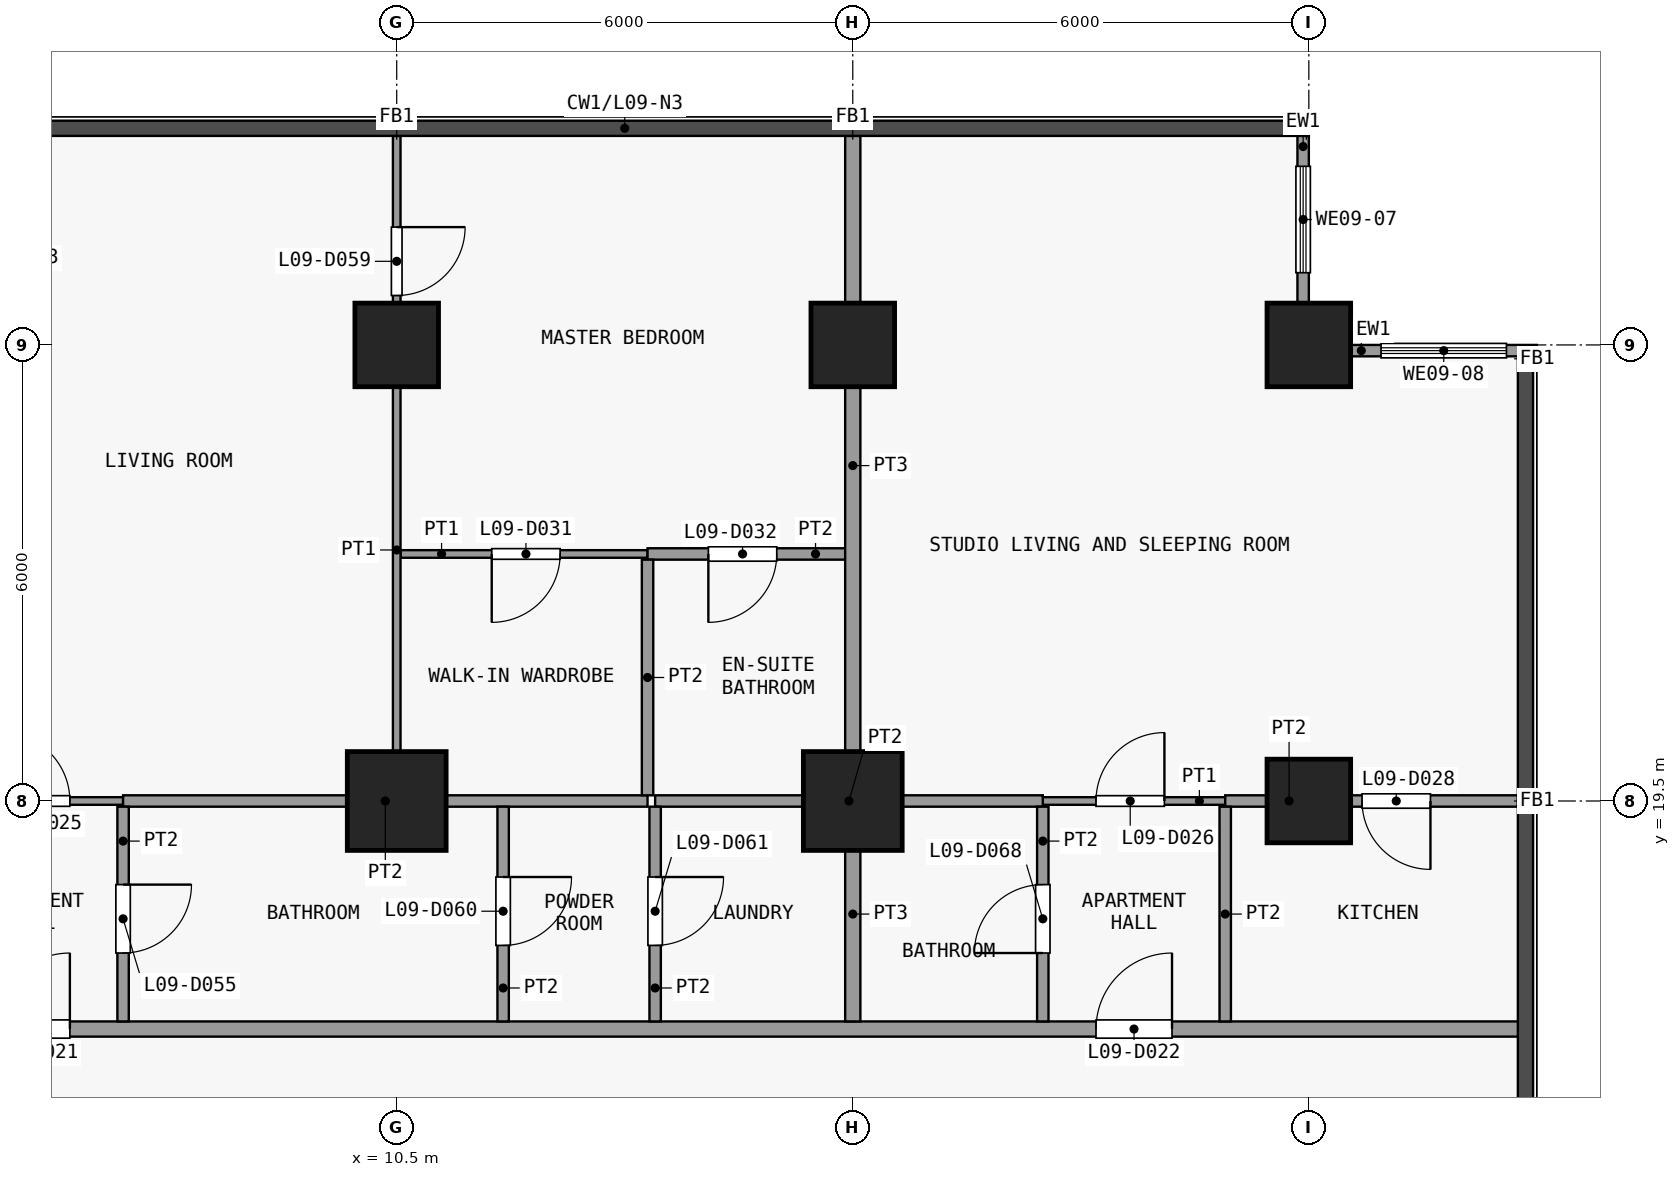
"""IFC4 building model, lengths in metres.
Left out: names, types, materials, properties, quantities, classifications, styles, units other than length and angle.
Written with IfcOpenShell. Run it as: python <this file> out.ifc"""

import sys

from ifc_helpers import new_model, si_unit, direction, frame, frame_2d, origin, origin_2d, place, context, subcontext, project, spatial, rectangle, extrude, element, fill, save


model = new_model("IFC4")
c1 = context("Model", 3, precision=1e-05, world=origin(), true_north=direction((0.0, 1.0)))
c2 = subcontext(c1, "Body", "Model", "MODEL_VIEW")
j1 = project(units=[si_unit("LENGTHUNIT", "METRE"), si_unit("PLANEANGLEUNIT", "RADIAN")], contexts=[c1])
p1 = place(None, origin())
s1 = spatial("IfcSite", under=j1, at=p1, CompositionType="ELEMENT")
p2 = place(p1, origin())
s2 = spatial("IfcBuilding", under=s1, at=p2, CompositionType="ELEMENT")
p3 = place(p2, frame((0.0, 0.0, 43.3)))
s3 = spatial("IfcBuildingStorey", under=s2, at=p3, CompositionType="ELEMENT", Elevation=43.3)
p4 = place(p3, frame((10.5, 19.5, 0.0), z_axis=(0.0, 0.0, 1.0), x_axis=(1.0, 0.0, 0.0)))
e1 = element("IfcColumn", 1, at=p4, inside=s3, PredefinedType="COLUMN", context=c2, shape_type="SweptSolid", body=[
    extrude(rectangle(XDim=1.3, YDim=1.3, at=origin_2d()), origin(), (0.0, 0.0, 1.0), 3.6),
])
p5 = place(p3, frame((10.5, 25.5, 0.0), z_axis=(0.0, 0.0, 1.0), x_axis=(1.0, 0.0, 0.0)))
e2 = element("IfcColumn", 2, at=p5, inside=s3, PredefinedType="COLUMN", context=c2, shape_type="SweptSolid", body=[
    extrude(rectangle(XDim=1.1, YDim=1.1, at=origin_2d()), origin(), (0.0, 0.0, 1.0), 3.6),
])
p6 = place(p3, frame((16.5, 19.5, 0.0), z_axis=(0.0, 0.0, 1.0), x_axis=(1.0, 0.0, 0.0)))
e3 = element("IfcColumn", 3, at=p6, inside=s3, PredefinedType="COLUMN", context=c2, shape_type="SweptSolid", body=[
    extrude(rectangle(XDim=1.3, YDim=1.3, at=origin_2d()), origin(), (0.0, 0.0, 1.0), 3.6),
])
for number, where, z_axis, x_axis in (
    (4, (16.5, 25.5, 0.0), (0.0, 0.0, 1.0), (1.0, 0.0, 0.0)),
    (5, (22.5, 19.5, 0.0), (0.0, 0.0, 1.0), (1.0, 0.0, 0.0)),
    (6, (22.5, 25.5, 0.0), (0.0, 0.0, 1.0), (1.0, 0.0, 0.0)),
):
    element("IfcColumn", number, at=place(p3, frame(where, z_axis=z_axis, x_axis=x_axis)), inside=s3, PredefinedType="COLUMN", context=c2, shape_type="SweptSolid", body=[
        extrude(rectangle(XDim=1.1, YDim=1.1, at=origin_2d()), origin(), (0.0, 0.0, 1.0), 3.6),
    ])
p7 = place(p3, frame((22.425, 28.25, 0.0), z_axis=(0.0, 0.0, 1.0), x_axis=(0.0, -1.0, 0.0)))
e7 = element("IfcWall", 7, at=p7, inside=s3, PredefinedType="SOLIDWALL", context=c2, shape_type="SweptSolid", body=[
    extrude(rectangle(XDim=2.2, YDim=0.15, at=frame_2d((1.1, 0.0))), origin(), (0.0, 0.0, 1.0), 3.3),
])
p8 = place(p7, frame((0.4, 0.0, 0.9)))
e8 = element("IfcOpeningElement", 8, at=p8, cuts=e7, PredefinedType="OPENING", context=c2, shape_type="SweptSolid", body=[
    extrude(rectangle(XDim=1.4, YDim=2.4, at=frame_2d((0.7, 1.2))), frame((0.0, 0.085, 0.0), z_axis=(0.0, -1.0, 0.0), x_axis=(1.0, 0.0, 0.0)), (0.0, 0.0, 1.0), 0.17),
])
p9 = place(p3, frame((23.05, 25.425, 0.0), z_axis=(0.0, 0.0, 1.0), x_axis=(1.0, 0.0, 0.0)))
e9 = element("IfcWall", 9, at=p9, inside=s3, PredefinedType="SOLIDWALL", context=c2, shape_type="SweptSolid", body=[
    extrude(rectangle(XDim=2.45, YDim=0.15, at=frame_2d((1.225, 0.0))), origin(), (0.0, 0.0, 1.0), 3.3),
])
p10 = place(p9, frame((0.4, 0.0, 0.9)))
e10 = element("IfcOpeningElement", 10, at=p10, cuts=e9, PredefinedType="OPENING", context=c2, shape_type="SweptSolid", body=[
    extrude(rectangle(XDim=1.65, YDim=2.4, at=frame_2d((0.825, 1.2))), frame((0.0, 0.085, 0.0), z_axis=(0.0, -1.0, 0.0), x_axis=(1.0, 0.0, 0.0)), (0.0, 0.0, 1.0), 0.17),
])
p11 = place(p3, frame((-25.35, 16.5, 0.0), z_axis=(0.0, 0.0, 1.0), x_axis=(1.0, 0.0, 0.0)))
e11 = element("IfcWall", 11, at=p11, inside=s3, PredefinedType="PARTITIONING", context=c2, shape_type="SweptSolid", body=[
    extrude(rectangle(XDim=50.7, YDim=0.2, at=frame_2d((25.35, 0.0))), origin(), (0.0, 0.0, 1.0), 3.3),
])
p12 = place(p11, frame((7.05, 0.0, 0.0)))
e12 = element("IfcOpeningElement", 12, at=p12, cuts=e11, PredefinedType="OPENING", context=c2, shape_type="SweptSolid", body=[
    extrude(rectangle(XDim=1.0, YDim=2.1, at=frame_2d((0.5, 1.05))), frame((0.0, 0.11, 0.0), z_axis=(0.0, -1.0, 0.0), x_axis=(1.0, 0.0, 0.0)), (0.0, 0.0, 1.0), 0.22),
])
p13 = place(p11, frame((15.55, 0.0, 0.0)))
e13 = element("IfcOpeningElement", 13, at=p13, cuts=e11, PredefinedType="OPENING", context=c2, shape_type="SweptSolid", body=[
    extrude(rectangle(XDim=1.0, YDim=2.1, at=frame_2d((0.5, 1.05))), frame((0.0, 0.11, 0.0), z_axis=(0.0, -1.0, 0.0), x_axis=(1.0, 0.0, 0.0)), (0.0, 0.0, 1.0), 0.22),
])
p14 = place(p11, frame((30.55, 0.0, 0.0)))
e14 = element("IfcOpeningElement", 14, at=p14, cuts=e11, PredefinedType="OPENING", context=c2, shape_type="SweptSolid", body=[
    extrude(rectangle(XDim=1.0, YDim=2.1, at=frame_2d((0.5, 1.05))), frame((0.0, 0.11, 0.0), z_axis=(0.0, -1.0, 0.0), x_axis=(1.0, 0.0, 0.0)), (0.0, 0.0, 1.0), 0.22),
])
p15 = place(p11, frame((45.05, 0.0, 0.0)))
e15 = element("IfcOpeningElement", 15, at=p15, cuts=e11, PredefinedType="OPENING", context=c2, shape_type="SweptSolid", body=[
    extrude(rectangle(XDim=1.0, YDim=2.1, at=frame_2d((0.5, 1.05))), frame((0.0, 0.11, 0.0), z_axis=(0.0, -1.0, 0.0), x_axis=(1.0, 0.0, 0.0)), (0.0, 0.0, 1.0), 0.22),
])
p16 = place(p3, frame((4.5, 19.5, 0.0), z_axis=(0.0, 0.0, 1.0), x_axis=(1.0, 0.0, 0.0)))
e16 = element("IfcWall", 16, at=p16, inside=s3, PredefinedType="PARTITIONING", context=c2, shape_type="SweptSolid", body=[
    extrude(rectangle(XDim=2.4, YDim=0.1, at=frame_2d((1.2, 0.0))), origin(), (0.0, 0.0, 1.0), 3.3),
])
p17 = place(p16, frame((0.8, 0.0, 0.0)))
e17 = element("IfcOpeningElement", 17, at=p17, cuts=e16, PredefinedType="OPENING", context=c2, shape_type="SweptSolid", body=[
    extrude(rectangle(XDim=0.9, YDim=2.1, at=frame_2d((0.45, 1.05))), frame((0.0, 0.06, 0.0), z_axis=(0.0, -1.0, 0.0), x_axis=(1.0, 0.0, 0.0)), (0.0, 0.0, 1.0), 0.12),
])
p18 = place(p3, frame((19.0, 19.5, 0.0), z_axis=(0.0, 0.0, 1.0), x_axis=(1.0, 0.0, 0.0)))
e18 = element("IfcWall", 18, at=p18, inside=s3, PredefinedType="PARTITIONING", context=c2, shape_type="SweptSolid", body=[
    extrude(rectangle(XDim=2.4, YDim=0.1, at=frame_2d((1.2, 0.0))), origin(), (0.0, 0.0, 1.0), 3.3),
])
p19 = place(p18, frame((0.7, 0.0, 0.0)))
e19 = element("IfcOpeningElement", 19, at=p19, cuts=e18, PredefinedType="OPENING", context=c2, shape_type="SweptSolid", body=[
    extrude(rectangle(XDim=0.9, YDim=2.1, at=frame_2d((0.45, 1.05))), frame((0.0, 0.06, 0.0), z_axis=(0.0, -1.0, 0.0), x_axis=(1.0, 0.0, 0.0)), (0.0, 0.0, 1.0), 0.12),
])
p20 = place(p3, frame((6.9, 19.5, 0.0), z_axis=(0.0, 0.0, 1.0), x_axis=(1.0, 0.0, 0.0)))
e20 = element("IfcWall", 20, at=p20, inside=s3, PredefinedType="PARTITIONING", context=c2, shape_type="SweptSolid", body=[
    extrude(rectangle(XDim=6.9, YDim=0.15, at=frame_2d((3.45, 0.0))), origin(), (0.0, 0.0, 1.0), 3.3),
])
p21 = place(p3, frame((13.9, 19.5, 0.0), z_axis=(0.0, 0.0, 1.0), x_axis=(1.0, 0.0, 0.0)))
e21 = element("IfcWall", 21, at=p21, inside=s3, PredefinedType="PARTITIONING", context=c2, shape_type="SweptSolid", body=[
    extrude(rectangle(XDim=5.1, YDim=0.15, at=frame_2d((2.55, 0.0))), origin(), (0.0, 0.0, 1.0), 3.3),
])
p22 = place(p3, frame((21.4, 19.5, 0.0), z_axis=(0.0, 0.0, 1.0), x_axis=(1.0, 0.0, 0.0)))
e22 = element("IfcWall", 22, at=p22, inside=s3, PredefinedType="PARTITIONING", context=c2, shape_type="SweptSolid", body=[
    extrude(rectangle(XDim=3.85, YDim=0.15, at=frame_2d((1.925, 0.0))), origin(), (0.0, 0.0, 1.0), 3.3),
])
p23 = place(p22, frame((1.8, 0.0, 0.0)))
e23 = element("IfcOpeningElement", 23, at=p23, cuts=e22, PredefinedType="OPENING", context=c2, shape_type="SweptSolid", body=[
    extrude(rectangle(XDim=0.9, YDim=2.1, at=frame_2d((0.45, 1.05))), frame((0.0, 0.085, 0.0), z_axis=(0.0, -1.0, 0.0), x_axis=(1.0, 0.0, 0.0)), (0.0, 0.0, 1.0), 0.17),
])
p24 = place(p3, frame((10.55, 22.75, 0.0), z_axis=(0.0, 0.0, 1.0), x_axis=(1.0, 0.0, 0.0)))
e24 = element("IfcWall", 24, at=p24, inside=s3, PredefinedType="PARTITIONING", context=c2, shape_type="SweptSolid", body=[
    extrude(rectangle(XDim=3.25, YDim=0.1, at=frame_2d((1.625, 0.0))), origin(), (0.0, 0.0, 1.0), 3.3),
])
p25 = place(p24, frame((1.2, 0.0, 0.0)))
e25 = element("IfcOpeningElement", 25, at=p25, cuts=e24, PredefinedType="OPENING", context=c2, shape_type="SweptSolid", body=[
    extrude(rectangle(XDim=0.9, YDim=2.1, at=frame_2d((0.45, 1.05))), frame((0.0, 0.06, 0.0), z_axis=(0.0, -1.0, 0.0), x_axis=(1.0, 0.0, 0.0)), (0.0, 0.0, 1.0), 0.12),
])
p26 = place(p3, frame((13.8, 22.75, 0.0), z_axis=(0.0, 0.0, 1.0), x_axis=(1.0, 0.0, 0.0)))
e26 = element("IfcWall", 26, at=p26, inside=s3, PredefinedType="PARTITIONING", context=c2, shape_type="SweptSolid", body=[
    extrude(rectangle(XDim=2.6, YDim=0.15, at=frame_2d((1.3, 0.0))), origin(), (0.0, 0.0, 1.0), 3.3),
])
p27 = place(p26, frame((0.8, 0.0, 0.0)))
e27 = element("IfcOpeningElement", 27, at=p27, cuts=e26, PredefinedType="OPENING", context=c2, shape_type="SweptSolid", body=[
    extrude(rectangle(XDim=0.9, YDim=2.1, at=frame_2d((0.45, 1.05))), frame((0.0, 0.085, 0.0), z_axis=(0.0, -1.0, 0.0), x_axis=(1.0, 0.0, 0.0)), (0.0, 0.0, 1.0), 0.17),
])
p28 = place(p3, frame((6.9, 16.6, 0.0), z_axis=(0.0, 0.0, 1.0), x_axis=(0.0, 1.0, 0.0)))
e28 = element("IfcWall", 28, at=p28, inside=s3, PredefinedType="PARTITIONING", context=c2, shape_type="SweptSolid", body=[
    extrude(rectangle(XDim=2.825, YDim=0.15, at=frame_2d((1.413, 0.0))), origin(), (0.0, 0.0, 1.0), 3.3),
])
p29 = place(p28, frame((0.9, 0.0, 0.0)))
e29 = element("IfcOpeningElement", 29, at=p29, cuts=e28, PredefinedType="OPENING", context=c2, shape_type="SweptSolid", body=[
    extrude(rectangle(XDim=0.9, YDim=2.1, at=frame_2d((0.45, 1.05))), frame((0.0, 0.085, 0.0), z_axis=(0.0, -1.0, 0.0), x_axis=(1.0, 0.0, 0.0)), (0.0, 0.0, 1.0), 0.17),
])
p30 = place(p3, frame((10.5, 19.575, 0.0), z_axis=(0.0, 0.0, 1.0), x_axis=(0.0, 1.0, 0.0)))
e30 = element("IfcWall", 30, at=p30, inside=s3, PredefinedType="PARTITIONING", context=c2, shape_type="SweptSolid", body=[
    extrude(rectangle(XDim=8.675, YDim=0.1, at=frame_2d((4.337, 0.0))), origin(), (0.0, 0.0, 1.0), 3.3),
])
p31 = place(p30, frame((6.575, 0.0, 0.0)))
e31 = element("IfcOpeningElement", 31, at=p31, cuts=e30, PredefinedType="OPENING", context=c2, shape_type="SweptSolid", body=[
    extrude(rectangle(XDim=0.9, YDim=2.1, at=frame_2d((0.45, 1.05))), frame((0.0, 0.06, 0.0), z_axis=(0.0, -1.0, 0.0), x_axis=(1.0, 0.0, 0.0)), (0.0, 0.0, 1.0), 0.12),
])
p32 = place(p3, frame((11.9, 16.6, 0.0), z_axis=(0.0, 0.0, 1.0), x_axis=(0.0, 1.0, 0.0)))
e32 = element("IfcWall", 32, at=p32, inside=s3, PredefinedType="PARTITIONING", context=c2, shape_type="SweptSolid", body=[
    extrude(rectangle(XDim=2.825, YDim=0.15, at=frame_2d((1.413, 0.0))), origin(), (0.0, 0.0, 1.0), 3.3),
])
p33 = place(p32, frame((1.0, 0.0, 0.0)))
e33 = element("IfcOpeningElement", 33, at=p33, cuts=e32, PredefinedType="OPENING", context=c2, shape_type="SweptSolid", body=[
    extrude(rectangle(XDim=0.9, YDim=2.1, at=frame_2d((0.45, 1.05))), frame((0.0, 0.085, 0.0), z_axis=(0.0, -1.0, 0.0), x_axis=(1.0, 0.0, 0.0)), (0.0, 0.0, 1.0), 0.17),
])
p34 = place(p3, frame((13.8, 19.575, 0.0), z_axis=(0.0, 0.0, 1.0), x_axis=(0.0, 1.0, 0.0)))
e34 = element("IfcWall", 34, at=p34, inside=s3, PredefinedType="PARTITIONING", context=c2, shape_type="SweptSolid", body=[
    extrude(rectangle(XDim=3.1, YDim=0.15, at=frame_2d((1.55, 0.0))), origin(), (0.0, 0.0, 1.0), 3.3),
])
p35 = place(p3, frame((13.9, 16.6, 0.0), z_axis=(0.0, 0.0, 1.0), x_axis=(0.0, 1.0, 0.0)))
e35 = element("IfcWall", 35, at=p35, inside=s3, PredefinedType="PARTITIONING", context=c2, shape_type="SweptSolid", body=[
    extrude(rectangle(XDim=2.825, YDim=0.15, at=frame_2d((1.413, 0.0))), origin(), (0.0, 0.0, 1.0), 3.3),
])
p36 = place(p35, frame((1.0, 0.0, 0.0)))
e36 = element("IfcOpeningElement", 36, at=p36, cuts=e35, PredefinedType="OPENING", context=c2, shape_type="SweptSolid", body=[
    extrude(rectangle(XDim=0.9, YDim=2.1, at=frame_2d((0.45, 1.05))), frame((0.0, 0.085, 0.0), z_axis=(0.0, -1.0, 0.0), x_axis=(1.0, 0.0, 0.0)), (0.0, 0.0, 1.0), 0.17),
])
p37 = place(p3, frame((16.5, 16.6, 0.0), z_axis=(0.0, 0.0, 1.0), x_axis=(0.0, 1.0, 0.0)))
e37 = element("IfcWall", 37, at=p37, inside=s3, PredefinedType="PARTITIONING", context=c2, shape_type="SweptSolid", body=[
    extrude(rectangle(XDim=2.825, YDim=0.2, at=frame_2d((1.413, 0.0))), origin(), (0.0, 0.0, 1.0), 3.3),
])
p38 = place(p3, frame((16.5, 19.575, 0.0), z_axis=(0.0, 0.0, 1.0), x_axis=(0.0, 1.0, 0.0)))
e38 = element("IfcWall", 38, at=p38, inside=s3, PredefinedType="PARTITIONING", context=c2, shape_type="SweptSolid", body=[
    extrude(rectangle(XDim=8.675, YDim=0.2, at=frame_2d((4.337, 0.0))), origin(), (0.0, 0.0, 1.0), 3.3),
])
p39 = place(p3, frame((19.0, 16.6, 0.0), z_axis=(0.0, 0.0, 1.0), x_axis=(0.0, 1.0, 0.0)))
e39 = element("IfcWall", 39, at=p39, inside=s3, PredefinedType="PARTITIONING", context=c2, shape_type="SweptSolid", body=[
    extrude(rectangle(XDim=2.825, YDim=0.15, at=frame_2d((1.413, 0.0))), origin(), (0.0, 0.0, 1.0), 3.3),
])
p40 = place(p39, frame((0.9, 0.0, 0.0)))
e40 = element("IfcOpeningElement", 40, at=p40, cuts=e39, PredefinedType="OPENING", context=c2, shape_type="SweptSolid", body=[
    extrude(rectangle(XDim=0.9, YDim=2.1, at=frame_2d((0.45, 1.05))), frame((0.0, 0.085, 0.0), z_axis=(0.0, -1.0, 0.0), x_axis=(1.0, 0.0, 0.0)), (0.0, 0.0, 1.0), 0.17),
])
p41 = place(p3, frame((21.4, 16.6, 0.0), z_axis=(0.0, 0.0, 1.0), x_axis=(0.0, 1.0, 0.0)))
e41 = element("IfcWall", 41, at=p41, inside=s3, PredefinedType="PARTITIONING", context=c2, shape_type="SweptSolid", body=[
    extrude(rectangle(XDim=2.825, YDim=0.15, at=frame_2d((1.413, 0.0))), origin(), (0.0, 0.0, 1.0), 3.3),
])
p42 = place(p8, origin())
e42 = element("IfcWindow", 42, at=p42, inside=s3, PartitioningType="SINGLE_PANEL", PredefinedType="WINDOW", context=c2, shape_type="SweptSolid", body=[
    extrude(rectangle(XDim=1.4, YDim=2.4, at=frame_2d((0.7, 1.2))), frame((0.0, 0.03, 0.0), z_axis=(0.0, -1.0, 0.0), x_axis=(1.0, 0.0, 0.0)), (0.0, 0.0, 1.0), 0.06),
])
fill(e8, e42)
p43 = place(p10, origin())
e43 = element("IfcWindow", 43, at=p43, inside=s3, PartitioningType="SINGLE_PANEL", PredefinedType="WINDOW", context=c2, shape_type="SweptSolid", body=[
    extrude(rectangle(XDim=1.65, YDim=2.4, at=frame_2d((0.825, 1.2))), frame((0.0, 0.03, 0.0), z_axis=(0.0, -1.0, 0.0), x_axis=(1.0, 0.0, 0.0)), (0.0, 0.0, 1.0), 0.06),
])
fill(e10, e43)
p44 = place(p14, origin())
e44 = element("IfcDoor", 44, at=p44, inside=s3, OperationType="SINGLE_SWING_LEFT", PredefinedType="DOOR", context=c2, shape_type="SweptSolid", body=[
    extrude(rectangle(XDim=1.0, YDim=2.1, at=frame_2d((0.5, 1.05))), frame((0.0, 0.025, 0.0), z_axis=(0.0, -1.0, 0.0), x_axis=(1.0, 0.0, 0.0)), (0.0, 0.0, 1.0), 0.05),
])
fill(e14, e44)
p45 = place(p15, origin())
e45 = element("IfcDoor", 45, at=p45, inside=s3, OperationType="SINGLE_SWING_LEFT", PredefinedType="DOOR", context=c2, shape_type="SweptSolid", body=[
    extrude(rectangle(XDim=1.0, YDim=2.1, at=frame_2d((0.5, 1.05))), frame((0.0, 0.025, 0.0), z_axis=(0.0, -1.0, 0.0), x_axis=(1.0, 0.0, 0.0)), (0.0, 0.0, 1.0), 0.05),
])
fill(e15, e45)
p46 = place(p17, origin())
e46 = element("IfcDoor", 46, at=p46, inside=s3, OperationType="SINGLE_SWING_RIGHT", PredefinedType="DOOR", context=c2, shape_type="SweptSolid", body=[
    extrude(rectangle(XDim=0.9, YDim=2.1, at=frame_2d((0.45, 1.05))), frame((0.0, 0.025, 0.0), z_axis=(0.0, -1.0, 0.0), x_axis=(1.0, 0.0, 0.0)), (0.0, 0.0, 1.0), 0.05),
])
fill(e17, e46)
p47 = place(p19, origin())
e47 = element("IfcDoor", 47, at=p47, inside=s3, OperationType="SINGLE_SWING_LEFT", PredefinedType="DOOR", context=c2, shape_type="SweptSolid", body=[
    extrude(rectangle(XDim=0.9, YDim=2.1, at=frame_2d((0.45, 1.05))), frame((0.0, 0.025, 0.0), z_axis=(0.0, -1.0, 0.0), x_axis=(1.0, 0.0, 0.0)), (0.0, 0.0, 1.0), 0.05),
])
fill(e19, e47)
p48 = place(p23, origin())
e48 = element("IfcDoor", 48, at=p48, inside=s3, OperationType="SINGLE_SWING_RIGHT", PredefinedType="DOOR", context=c2, shape_type="SweptSolid", body=[
    extrude(rectangle(XDim=0.9, YDim=2.1, at=frame_2d((0.45, 1.05))), frame((0.0, 0.025, 0.0), z_axis=(0.0, -1.0, 0.0), x_axis=(1.0, 0.0, 0.0)), (0.0, 0.0, 1.0), 0.05),
])
fill(e23, e48)
p49 = place(p25, origin())
e49 = element("IfcDoor", 49, at=p49, inside=s3, OperationType="SINGLE_SWING_LEFT", PredefinedType="DOOR", context=c2, shape_type="SweptSolid", body=[
    extrude(rectangle(XDim=0.9, YDim=2.1, at=frame_2d((0.45, 1.05))), frame((0.0, 0.025, 0.0), z_axis=(0.0, -1.0, 0.0), x_axis=(1.0, 0.0, 0.0)), (0.0, 0.0, 1.0), 0.05),
])
fill(e25, e49)
p50 = place(p27, origin())
e50 = element("IfcDoor", 50, at=p50, inside=s3, OperationType="SINGLE_SWING_LEFT", PredefinedType="DOOR", context=c2, shape_type="SweptSolid", body=[
    extrude(rectangle(XDim=0.9, YDim=2.1, at=frame_2d((0.45, 1.05))), frame((0.0, 0.025, 0.0), z_axis=(0.0, -1.0, 0.0), x_axis=(1.0, 0.0, 0.0)), (0.0, 0.0, 1.0), 0.05),
])
fill(e27, e50)
p51 = place(p29, origin())
e51 = element("IfcDoor", 51, at=p51, inside=s3, OperationType="SINGLE_SWING_RIGHT", PredefinedType="DOOR", context=c2, shape_type="SweptSolid", body=[
    extrude(rectangle(XDim=0.9, YDim=2.1, at=frame_2d((0.45, 1.05))), frame((0.0, 0.025, 0.0), z_axis=(0.0, -1.0, 0.0), x_axis=(1.0, 0.0, 0.0)), (0.0, 0.0, 1.0), 0.05),
])
fill(e29, e51)
p52 = place(p31, origin())
e52 = element("IfcDoor", 52, at=p52, inside=s3, OperationType="SINGLE_SWING_RIGHT", PredefinedType="DOOR", context=c2, shape_type="SweptSolid", body=[
    extrude(rectangle(XDim=0.9, YDim=2.1, at=frame_2d((0.45, 1.05))), frame((0.0, 0.025, 0.0), z_axis=(0.0, -1.0, 0.0), x_axis=(1.0, 0.0, 0.0)), (0.0, 0.0, 1.0), 0.05),
])
fill(e31, e52)
p53 = place(p33, origin())
e53 = element("IfcDoor", 53, at=p53, inside=s3, OperationType="SINGLE_SWING_RIGHT", PredefinedType="DOOR", context=c2, shape_type="SweptSolid", body=[
    extrude(rectangle(XDim=0.9, YDim=2.1, at=frame_2d((0.45, 1.05))), frame((0.0, 0.025, 0.0), z_axis=(0.0, -1.0, 0.0), x_axis=(1.0, 0.0, 0.0)), (0.0, 0.0, 1.0), 0.05),
])
fill(e33, e53)
p54 = place(p36, origin())
e54 = element("IfcDoor", 54, at=p54, inside=s3, OperationType="SINGLE_SWING_RIGHT", PredefinedType="DOOR", context=c2, shape_type="SweptSolid", body=[
    extrude(rectangle(XDim=0.9, YDim=2.1, at=frame_2d((0.45, 1.05))), frame((0.0, 0.025, 0.0), z_axis=(0.0, -1.0, 0.0), x_axis=(1.0, 0.0, 0.0)), (0.0, 0.0, 1.0), 0.05),
])
fill(e36, e54)
p55 = place(p40, origin())
e55 = element("IfcDoor", 55, at=p55, inside=s3, OperationType="SINGLE_SWING_RIGHT", PredefinedType="DOOR", context=c2, shape_type="SweptSolid", body=[
    extrude(rectangle(XDim=0.9, YDim=2.1, at=frame_2d((0.45, 1.05))), frame((0.0, 0.025, 0.0), z_axis=(0.0, -1.0, 0.0), x_axis=(1.0, 0.0, 0.0)), (0.0, 0.0, 1.0), 0.05),
])
fill(e40, e55)
save(model, sys.argv[1])
